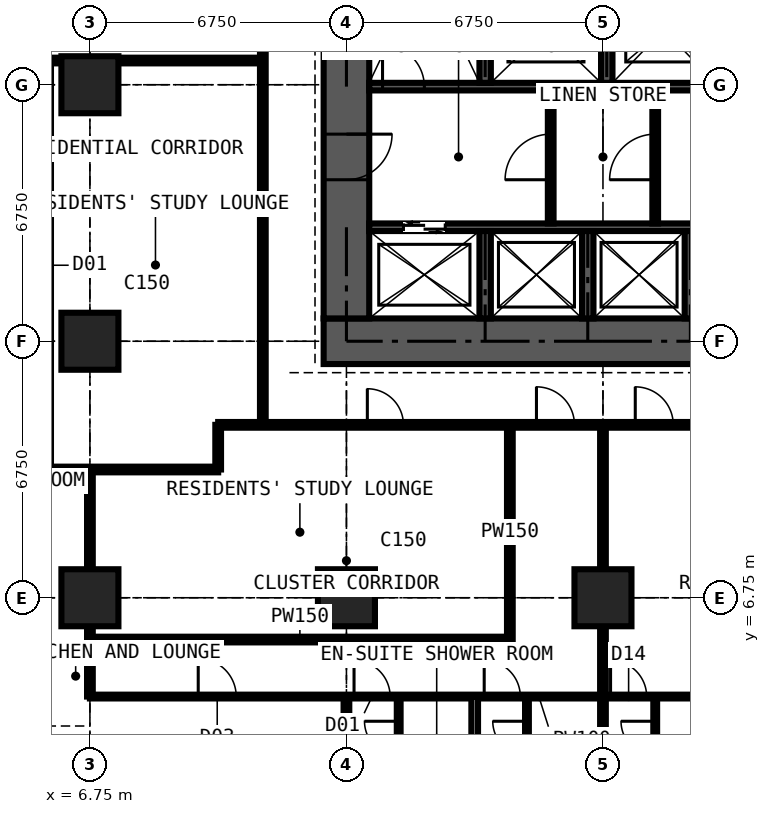
"""IFC4 building model, lengths in metres.
Left out: names, types, materials, properties, quantities, classifications, styles, units other than length and angle.
Written with IfcOpenShell. Run it as: python <this file> out.ifc"""

import sys

from ifc_helpers import new_model, si_unit, direction, frame, frame_2d, origin, origin_2d, place, context, subcontext, project, spatial, rectangle, extrude, element, fill, save


model = new_model("IFC4")
c1 = context("Model", 3, precision=1e-05, world=origin(), true_north=direction((0.0, 1.0)))
c2 = subcontext(c1, "Body", "Model", "MODEL_VIEW")
j1 = project(units=[si_unit("LENGTHUNIT", "METRE"), si_unit("PLANEANGLEUNIT", "RADIAN")], contexts=[c1])
p1 = place(None, origin())
s1 = spatial("IfcSite", under=j1, at=p1, CompositionType="ELEMENT")
p2 = place(p1, origin())
s2 = spatial("IfcBuilding", under=s1, at=p2, CompositionType="ELEMENT")
p3 = place(p2, frame((0.0, 0.0, 123.3)))
s3 = spatial("IfcBuildingStorey", under=s2, at=p3, CompositionType="ELEMENT", Elevation=123.3)
for number, where, z_axis, x_axis in (
    (1, (6.75, 6.75, 0.0), (0.0, 0.0, 1.0), (1.0, 0.0, 0.0)),
    (2, (6.75, 13.5, 0.0), (0.0, 0.0, 1.0), (1.0, 0.0, 0.0)),
    (3, (6.75, 20.25, 0.0), (0.0, 0.0, 1.0), (1.0, 0.0, 0.0)),
    (4, (13.5, 6.75, 0.0), (0.0, 0.0, 1.0), (1.0, 0.0, 0.0)),
    (5, (20.25, 6.75, 0.0), (0.0, 0.0, 1.0), (1.0, 0.0, 0.0)),
):
    element("IfcColumn", number, at=place(p3, frame(where, z_axis=z_axis, x_axis=x_axis)), inside=s3, PredefinedType="COLUMN", context=c2, shape_type="SweptSolid", body=[
        extrude(rectangle(XDim=1.5, YDim=1.5, at=origin_2d()), origin(), (0.0, 0.0, 1.0), 3.6),
    ])
p4 = place(p3, frame((12.9, 13.5, 0.0), z_axis=(0.0, 0.0, 1.0), x_axis=(1.0, 0.0, 0.0)))
e6 = element("IfcWall", 6, at=p4, inside=s3, PredefinedType="SHEAR", context=c2, shape_type="SweptSolid", body=[
    extrude(rectangle(XDim=14.7, YDim=1.2, at=frame_2d((7.35, 0.0))), origin(), (0.0, 0.0, 1.0), 3.6),
])
p5 = place(p3, frame((13.5, 26.4, 0.0), z_axis=(0.0, 0.0, 1.0), x_axis=(0.0, -1.0, 0.0)))
e7 = element("IfcWall", 7, at=p5, inside=s3, PredefinedType="SHEAR", context=c2, shape_type="SweptSolid", body=[
    extrude(rectangle(XDim=12.3, YDim=1.2, at=frame_2d((6.15, 0.0))), origin(), (0.0, 0.0, 1.0), 3.6),
])
p6 = place(p5, frame((7.45, 0.0, 0.0)))
e8 = element("IfcOpeningElement", 8, at=p6, cuts=e7, PredefinedType="OPENING", context=c2, shape_type="SweptSolid", body=[
    extrude(rectangle(XDim=1.2, YDim=2.2, at=frame_2d((0.6, 1.1))), frame((0.0, 0.61, 0.0), z_axis=(0.0, -1.0, 0.0), x_axis=(1.0, 0.0, 0.0)), (0.0, 0.0, 1.0), 1.22),
])
p7 = place(p3, frame((14.1, 16.5, 0.0), z_axis=(0.0, 0.0, 1.0), x_axis=(1.0, 0.0, 0.0)))
e9 = element("IfcWall", 9, at=p7, inside=s3, PredefinedType="SHEAR", context=c2, shape_type="SweptSolid", body=[
    extrude(rectangle(XDim=12.3, YDim=0.2, at=frame_2d((6.15, 0.0))), origin(), (0.0, 0.0, 1.0), 3.6),
])
p8 = place(p7, frame((0.9, 0.0, 0.0)))
e10 = element("IfcOpeningElement", 10, at=p8, cuts=e9, PredefinedType="OPENING", context=c2, shape_type="SweptSolid", body=[
    extrude(rectangle(XDim=1.1, YDim=2.2, at=frame_2d((0.55, 1.1))), frame((0.0, 0.11, 0.0), z_axis=(0.0, -1.0, 0.0), x_axis=(1.0, 0.0, 0.0)), (0.0, 0.0, 1.0), 0.22),
])
p9 = place(p7, frame((9.5, 0.0, 0.0)))
e11 = element("IfcOpeningElement", 11, at=p9, cuts=e9, PredefinedType="OPENING", context=c2, shape_type="SweptSolid", body=[
    extrude(rectangle(XDim=1.1, YDim=2.2, at=frame_2d((0.55, 1.1))), frame((0.0, 0.11, 0.0), z_axis=(0.0, -1.0, 0.0), x_axis=(1.0, 0.0, 0.0)), (0.0, 0.0, 1.0), 0.22),
])
p10 = place(p3, frame((14.1, 20.2, 0.0), z_axis=(0.0, 0.0, 1.0), x_axis=(1.0, 0.0, 0.0)))
e12 = element("IfcWall", 12, at=p10, inside=s3, PredefinedType="SHEAR", context=c2, shape_type="SweptSolid", body=[
    extrude(rectangle(XDim=12.3, YDim=0.2, at=frame_2d((6.15, 0.0))), origin(), (0.0, 0.0, 1.0), 3.6),
])
p11 = place(p10, frame((0.35, 0.0, 0.0)))
e13 = element("IfcOpeningElement", 13, at=p11, cuts=e12, PredefinedType="OPENING", context=c2, shape_type="SweptSolid", body=[
    extrude(rectangle(XDim=1.1, YDim=2.2, at=frame_2d((0.55, 1.1))), frame((0.0, 0.11, 0.0), z_axis=(0.0, -1.0, 0.0), x_axis=(1.0, 0.0, 0.0)), (0.0, 0.0, 1.0), 0.22),
])
p12 = place(p10, frame((9.75, 0.0, 0.0)))
e14 = element("IfcOpeningElement", 14, at=p12, cuts=e12, PredefinedType="OPENING", context=c2, shape_type="SweptSolid", body=[
    extrude(rectangle(XDim=1.1, YDim=2.2, at=frame_2d((0.55, 1.1))), frame((0.0, 0.11, 0.0), z_axis=(0.0, -1.0, 0.0), x_axis=(1.0, 0.0, 0.0)), (0.0, 0.0, 1.0), 0.22),
])
p13 = place(p3, frame((17.15, 20.3, 0.0), z_axis=(0.0, 0.0, 1.0), x_axis=(0.0, 1.0, 0.0)))
e15 = element("IfcWall", 15, at=p13, inside=s3, PredefinedType="SHEAR", context=c2, shape_type="SweptSolid", body=[
    extrude(rectangle(XDim=6.1, YDim=0.3, at=frame_2d((3.05, 0.0))), origin(), (0.0, 0.0, 1.0), 3.6),
])
p14 = place(p3, frame((20.35, 20.3, 0.0), z_axis=(0.0, 0.0, 1.0), x_axis=(0.0, 1.0, 0.0)))
e16 = element("IfcWall", 16, at=p14, inside=s3, PredefinedType="SHEAR", context=c2, shape_type="SweptSolid", body=[
    extrude(rectangle(XDim=2.8, YDim=0.3, at=frame_2d((1.4, 0.0))), origin(), (0.0, 0.0, 1.0), 3.6),
])
for number, where, z_axis, x_axis in (
    (17, (17.15, 14.1, 0.0), (0.0, 0.0, 1.0), (0.0, 1.0, 0.0)),
    (18, (19.85, 14.1, 0.0), (0.0, 0.0, 1.0), (0.0, 1.0, 0.0)),
    (19, (22.55, 14.1, 0.0), (0.0, 0.0, 1.0), (0.0, 1.0, 0.0)),
):
    element("IfcWall", number, at=place(p3, frame(where, z_axis=z_axis, x_axis=x_axis)), inside=s3, PredefinedType="SHEAR", context=c2, shape_type="SweptSolid", body=[
        extrude(rectangle(XDim=2.3, YDim=0.3, at=frame_2d((1.15, 0.0))), origin(), (0.0, 0.0, 1.0), 3.6),
    ])
p15 = place(p3, frame((18.875, 16.6, 0.0), z_axis=(0.0, 0.0, 1.0), x_axis=(0.0, 1.0, 0.0)))
e20 = element("IfcWall", 20, at=p15, inside=s3, PredefinedType="PARTITIONING", context=c2, shape_type="SweptSolid", body=[
    extrude(rectangle(XDim=3.5, YDim=0.15, at=frame_2d((1.75, 0.0))), origin(), (0.0, 0.0, 1.0), 3.375),
])
p16 = place(p15, frame((1.15, 0.0, 0.0)))
e21 = element("IfcOpeningElement", 21, at=p16, cuts=e20, PredefinedType="OPENING", context=c2, shape_type="SweptSolid", body=[
    extrude(rectangle(XDim=1.2, YDim=2.2, at=frame_2d((0.6, 1.1))), frame((0.0, 0.085, 0.0), z_axis=(0.0, -1.0, 0.0), x_axis=(1.0, 0.0, 0.0)), (0.0, 0.0, 1.0), 0.17),
])
p17 = place(p3, frame((21.625, 16.6, 0.0), z_axis=(0.0, 0.0, 1.0), x_axis=(0.0, 1.0, 0.0)))
e22 = element("IfcWall", 22, at=p17, inside=s3, PredefinedType="PARTITIONING", context=c2, shape_type="SweptSolid", body=[
    extrude(rectangle(XDim=3.5, YDim=0.15, at=frame_2d((1.75, 0.0))), origin(), (0.0, 0.0, 1.0), 3.375),
])
p18 = place(p17, frame((1.15, 0.0, 0.0)))
e23 = element("IfcOpeningElement", 23, at=p18, cuts=e22, PredefinedType="OPENING", context=c2, shape_type="SweptSolid", body=[
    extrude(rectangle(XDim=1.2, YDim=2.2, at=frame_2d((0.6, 1.1))), frame((0.0, 0.085, 0.0), z_axis=(0.0, -1.0, 0.0), x_axis=(1.0, 0.0, 0.0)), (0.0, 0.0, 1.0), 0.17),
])
p19 = place(p3, frame((-0.734, 10.125, 0.0), z_axis=(0.0, 0.0, 1.0), x_axis=(1.0, 0.0, 0.0)))
e24 = element("IfcWall", 24, at=p19, inside=s3, PredefinedType="PARTITIONING", context=c2, shape_type="SweptSolid", body=[
    extrude(rectangle(XDim=10.859, YDim=0.15, at=frame_2d((5.429, 0.0))), origin(), (0.0, 0.0, 1.0), 3.375),
])
p20 = place(p3, frame((5.65, 20.887, 0.0), z_axis=(0.0, 0.0, 1.0), x_axis=(1.0, 0.0, 0.0)))
e25 = element("IfcWall", 25, at=p20, inside=s3, PredefinedType="PARTITIONING", context=c2, shape_type="SweptSolid", body=[
    extrude(rectangle(XDim=5.65, YDim=0.15, at=frame_2d((2.825, 0.0))), origin(), (0.0, 0.0, 1.0), 3.375),
])
p21 = place(p3, frame((6.75, 4.15, 0.0), z_axis=(0.0, 0.0, 1.0), x_axis=(0.0, 1.0, 0.0)))
e26 = element("IfcWall", 26, at=p21, inside=s3, PredefinedType="PARTITIONING", context=c2, shape_type="SweptSolid", body=[
    extrude(rectangle(XDim=5.975, YDim=0.15, at=frame_2d((2.988, 0.0))), origin(), (0.0, 0.0, 1.0), 2.877),
])
p22 = place(p3, frame((6.75, 4.15, 0.0), z_axis=(0.0, 0.0, 1.0), x_axis=(1.0, 0.0, 0.0)))
e27 = element("IfcWall", 27, at=p22, inside=s3, PredefinedType="PARTITIONING", context=c2, shape_type="SweptSolid", body=[
    extrude(rectangle(XDim=23.625, YDim=0.1, at=frame_2d((11.812, 0.0))), origin(), (0.0, 0.0, 1.0), 3.375),
])
p23 = place(p22, frame((2.85, 0.0, 0.0)))
e28 = element("IfcOpeningElement", 28, at=p23, cuts=e27, PredefinedType="OPENING", context=c2, shape_type="SweptSolid", body=[
    extrude(rectangle(XDim=1.0, YDim=2.2, at=frame_2d((0.5, 1.1))), frame((0.0, 0.06, 0.0), z_axis=(0.0, -1.0, 0.0), x_axis=(1.0, 0.0, 0.0)), (0.0, 0.0, 1.0), 0.12),
])
p24 = place(p22, frame((6.95, 0.0, 0.0)))
e29 = element("IfcOpeningElement", 29, at=p24, cuts=e27, PredefinedType="OPENING", context=c2, shape_type="SweptSolid", body=[
    extrude(rectangle(XDim=0.95, YDim=2.2, at=frame_2d((0.475, 1.1))), frame((0.0, 0.06, 0.0), z_axis=(0.0, -1.0, 0.0), x_axis=(1.0, 0.0, 0.0)), (0.0, 0.0, 1.0), 0.12),
])
p25 = place(p22, frame((10.375, 0.0, 0.0)))
e30 = element("IfcOpeningElement", 30, at=p25, cuts=e27, PredefinedType="OPENING", context=c2, shape_type="SweptSolid", body=[
    extrude(rectangle(XDim=0.95, YDim=2.2, at=frame_2d((0.475, 1.1))), frame((0.0, 0.06, 0.0), z_axis=(0.0, -1.0, 0.0), x_axis=(1.0, 0.0, 0.0)), (0.0, 0.0, 1.0), 0.12),
])
p26 = place(p22, frame((13.7, 0.0, 0.0)))
e31 = element("IfcOpeningElement", 31, at=p26, cuts=e27, PredefinedType="OPENING", context=c2, shape_type="SweptSolid", body=[
    extrude(rectangle(XDim=0.95, YDim=2.2, at=frame_2d((0.475, 1.1))), frame((0.0, 0.06, 0.0), z_axis=(0.0, -1.0, 0.0), x_axis=(1.0, 0.0, 0.0)), (0.0, 0.0, 1.0), 0.12),
])
p27 = place(p22, frame((17.125, 0.0, 0.0)))
e32 = element("IfcOpeningElement", 32, at=p27, cuts=e27, PredefinedType="OPENING", context=c2, shape_type="SweptSolid", body=[
    extrude(rectangle(XDim=0.95, YDim=2.2, at=frame_2d((0.475, 1.1))), frame((0.0, 0.06, 0.0), z_axis=(0.0, -1.0, 0.0), x_axis=(1.0, 0.0, 0.0)), (0.0, 0.0, 1.0), 0.12),
])
p28 = place(p22, frame((20.5, 0.0, 0.0)))
e33 = element("IfcOpeningElement", 33, at=p28, cuts=e27, PredefinedType="OPENING", context=c2, shape_type="SweptSolid", body=[
    extrude(rectangle(XDim=0.95, YDim=2.2, at=frame_2d((0.475, 1.1))), frame((0.0, 0.06, 0.0), z_axis=(0.0, -1.0, 0.0), x_axis=(1.0, 0.0, 0.0)), (0.0, 0.0, 1.0), 0.12),
])
p29 = place(p3, frame((6.75, 5.65, 0.0), z_axis=(0.0, 0.0, 1.0), x_axis=(1.0, 0.0, 0.0)))
e34 = element("IfcWall", 34, at=p29, inside=s3, PredefinedType="PARTITIONING", context=c2, shape_type="SweptSolid", body=[
    extrude(rectangle(XDim=11.05, YDim=0.15, at=frame_2d((5.525, 0.0))), origin(), (0.0, 0.0, 1.0), 3.375),
])
p30 = place(p3, frame((10.125, 10.125, 0.0), z_axis=(0.0, 0.0, 1.0), x_axis=(0.0, 1.0, 0.0)))
e35 = element("IfcWall", 35, at=p30, inside=s3, PredefinedType="PARTITIONING", context=c2, shape_type="SweptSolid", body=[
    extrude(rectangle(XDim=1.175, YDim=0.15, at=frame_2d((0.587, 0.0))), origin(), (0.0, 0.0, 1.0), 3.375),
])
p31 = place(p3, frame((10.125, 11.3, 0.0), z_axis=(0.0, 0.0, 1.0), x_axis=(1.0, 0.0, 0.0)))
e36 = element("IfcWall", 36, at=p31, inside=s3, PredefinedType="PARTITIONING", context=c2, shape_type="SweptSolid", body=[
    extrude(rectangle(XDim=20.675, YDim=0.15, at=frame_2d((10.337, 0.0))), origin(), (0.0, 0.0, 1.0), 3.375),
])
p32 = place(p31, frame((8.375, 0.0, 0.0)))
e37 = element("IfcOpeningElement", 37, at=p32, cuts=e36, PredefinedType="OPENING", context=c2, shape_type="SweptSolid", body=[
    extrude(rectangle(XDim=1.0, YDim=2.2, at=frame_2d((0.5, 1.1))), frame((0.0, 0.085, 0.0), z_axis=(0.0, -1.0, 0.0), x_axis=(1.0, 0.0, 0.0)), (0.0, 0.0, 1.0), 0.17),
])
p33 = place(p31, frame((10.975, 0.0, 0.0)))
e38 = element("IfcOpeningElement", 38, at=p33, cuts=e36, PredefinedType="OPENING", context=c2, shape_type="SweptSolid", body=[
    extrude(rectangle(XDim=1.0, YDim=2.2, at=frame_2d((0.5, 1.1))), frame((0.0, 0.085, 0.0), z_axis=(0.0, -1.0, 0.0), x_axis=(1.0, 0.0, 0.0)), (0.0, 0.0, 1.0), 0.17),
])
p34 = place(p31, frame((3.925, 0.0, 0.0)))
e39 = element("IfcOpeningElement", 39, at=p34, cuts=e36, PredefinedType="OPENING", context=c2, shape_type="SweptSolid", body=[
    extrude(rectangle(XDim=0.95, YDim=2.2, at=frame_2d((0.475, 1.1))), frame((0.0, 0.085, 0.0), z_axis=(0.0, -1.0, 0.0), x_axis=(1.0, 0.0, 0.0)), (0.0, 0.0, 1.0), 0.17),
])
p35 = place(p3, frame((11.3, 11.3, 0.0), z_axis=(0.0, 0.0, 1.0), x_axis=(0.0, 1.0, 0.0)))
e40 = element("IfcWall", 40, at=p35, inside=s3, PredefinedType="PARTITIONING", context=c2, shape_type="SweptSolid", body=[
    extrude(rectangle(XDim=19.3, YDim=0.15, at=frame_2d((9.65, 0.0))), origin(), (0.0, 0.0, 1.0), 3.375),
])
p36 = place(p35, frame((18.1, 0.0, 0.0)))
e41 = element("IfcOpeningElement", 41, at=p36, cuts=e40, PredefinedType="OPENING", context=c2, shape_type="SweptSolid", body=[
    extrude(rectangle(XDim=1.0, YDim=2.2, at=frame_2d((0.5, 1.1))), frame((0.0, 0.085, 0.0), z_axis=(0.0, -1.0, 0.0), x_axis=(1.0, 0.0, 0.0)), (0.0, 0.0, 1.0), 0.17),
])
p37 = place(p35, frame((10.137, 0.0, 0.0)))
e42 = element("IfcOpeningElement", 42, at=p37, cuts=e40, PredefinedType="OPENING", context=c2, shape_type="SweptSolid", body=[
    extrude(rectangle(XDim=1.0, YDim=2.2, at=frame_2d((0.5, 1.1))), frame((0.0, 0.085, 0.0), z_axis=(0.0, -1.0, 0.0), x_axis=(1.0, 0.0, 0.0)), (0.0, 0.0, 1.0), 0.17),
])
p38 = place(p3, frame((13.5, -0.734, 0.0), z_axis=(0.0, 0.0, 1.0), x_axis=(0.0, 1.0, 0.0)))
e43 = element("IfcWall", 43, at=p38, inside=s3, PredefinedType="PARTITIONING", context=c2, shape_type="SweptSolid", body=[
    extrude(rectangle(XDim=4.884, YDim=0.15, at=frame_2d((2.442, 0.0))), origin(), (0.0, 0.0, 1.0), 2.877),
])
p39 = place(p3, frame((14.875, 1.95, 0.0), z_axis=(0.0, 0.0, 1.0), x_axis=(0.0, 1.0, 0.0)))
e44 = element("IfcWall", 44, at=p39, inside=s3, PredefinedType="PARTITIONING", context=c2, shape_type="SweptSolid", body=[
    extrude(rectangle(XDim=2.2, YDim=0.1, at=frame_2d((1.1, 0.0))), origin(), (0.0, 0.0, 1.0), 3.375),
])
p40 = place(p39, frame((0.65, 0.0, 0.0)))
e45 = element("IfcOpeningElement", 45, at=p40, cuts=e44, PredefinedType="OPENING", context=c2, shape_type="SweptSolid", body=[
    extrude(rectangle(XDim=0.9, YDim=2.2, at=frame_2d((0.45, 1.1))), frame((0.0, 0.06, 0.0), z_axis=(0.0, -1.0, 0.0), x_axis=(1.0, 0.0, 0.0)), (0.0, 0.0, 1.0), 0.12),
])
p41 = place(p3, frame((16.875, -0.734, 0.0), z_axis=(0.0, 0.0, 1.0), x_axis=(0.0, 1.0, 0.0)))
e46 = element("IfcWall", 46, at=p41, inside=s3, PredefinedType="PARTITIONING", context=c2, shape_type="SweptSolid", body=[
    extrude(rectangle(XDim=4.884, YDim=0.175, at=frame_2d((2.442, 0.0))), origin(), (0.0, 0.0, 1.0), 3.375),
])
p42 = place(p3, frame((17.8, 5.65, 0.0), z_axis=(0.0, 0.0, 1.0), x_axis=(0.0, 1.0, 0.0)))
e47 = element("IfcWall", 47, at=p42, inside=s3, PredefinedType="PARTITIONING", context=c2, shape_type="SweptSolid", body=[
    extrude(rectangle(XDim=5.65, YDim=0.15, at=frame_2d((2.825, 0.0))), origin(), (0.0, 0.0, 1.0), 3.375),
])
p43 = place(p3, frame((18.25, 1.95, 0.0), z_axis=(0.0, 0.0, 1.0), x_axis=(0.0, 1.0, 0.0)))
e48 = element("IfcWall", 48, at=p43, inside=s3, PredefinedType="PARTITIONING", context=c2, shape_type="SweptSolid", body=[
    extrude(rectangle(XDim=2.2, YDim=0.1, at=frame_2d((1.1, 0.0))), origin(), (0.0, 0.0, 1.0), 3.375),
])
p44 = place(p43, frame((0.65, 0.0, 0.0)))
e49 = element("IfcOpeningElement", 49, at=p44, cuts=e48, PredefinedType="OPENING", context=c2, shape_type="SweptSolid", body=[
    extrude(rectangle(XDim=0.9, YDim=2.2, at=frame_2d((0.45, 1.1))), frame((0.0, 0.06, 0.0), z_axis=(0.0, -1.0, 0.0), x_axis=(1.0, 0.0, 0.0)), (0.0, 0.0, 1.0), 0.12),
])
p45 = place(p3, frame((20.25, -0.734, 0.0), z_axis=(0.0, 0.0, 1.0), x_axis=(0.0, 1.0, 0.0)))
e50 = element("IfcWall", 50, at=p45, inside=s3, PredefinedType="PARTITIONING", context=c2, shape_type="SweptSolid", body=[
    extrude(rectangle(XDim=12.034, YDim=0.15, at=frame_2d((6.017, 0.0))), origin(), (0.0, 0.0, 1.0), 2.61),
])
p46 = place(p3, frame((21.625, 1.95, 0.0), z_axis=(0.0, 0.0, 1.0), x_axis=(0.0, 1.0, 0.0)))
e51 = element("IfcWall", 51, at=p46, inside=s3, PredefinedType="PARTITIONING", context=c2, shape_type="SweptSolid", body=[
    extrude(rectangle(XDim=2.2, YDim=0.1, at=frame_2d((1.1, 0.0))), origin(), (0.0, 0.0, 1.0), 3.375),
])
p47 = place(p46, frame((0.65, 0.0, 0.0)))
e52 = element("IfcOpeningElement", 52, at=p47, cuts=e51, PredefinedType="OPENING", context=c2, shape_type="SweptSolid", body=[
    extrude(rectangle(XDim=0.9, YDim=2.2, at=frame_2d((0.45, 1.1))), frame((0.0, 0.06, 0.0), z_axis=(0.0, -1.0, 0.0), x_axis=(1.0, 0.0, 0.0)), (0.0, 0.0, 1.0), 0.12),
])
p48 = place(p8, origin())
e53 = element("IfcDoor", 53, at=p48, inside=s3, OperationType="DOUBLE_DOOR_SLIDING", PredefinedType="DOOR", context=c2, shape_type="SweptSolid", body=[
    extrude(rectangle(XDim=1.1, YDim=2.2, at=frame_2d((0.55, 1.1))), frame((0.0, 0.025, 0.0), z_axis=(0.0, -1.0, 0.0), x_axis=(1.0, 0.0, 0.0)), (0.0, 0.0, 1.0), 0.05),
])
fill(e10, e53)
p49 = place(p6, origin())
e54 = element("IfcDoor", 54, at=p49, inside=s3, OperationType="DOUBLE_DOOR_SINGLE_SWING", PredefinedType="DOOR", context=c2, shape_type="SweptSolid", body=[
    extrude(rectangle(XDim=1.2, YDim=2.2, at=frame_2d((0.6, 1.1))), frame((0.0, 0.025, 0.0), z_axis=(0.0, -1.0, 0.0), x_axis=(1.0, 0.0, 0.0)), (0.0, 0.0, 1.0), 0.05),
])
fill(e8, e54)
p50 = place(p16, origin())
e55 = element("IfcDoor", 55, at=p50, inside=s3, OperationType="DOUBLE_DOOR_SINGLE_SWING", PredefinedType="DOOR", context=c2, shape_type="SweptSolid", body=[
    extrude(rectangle(XDim=1.2, YDim=2.2, at=frame_2d((0.6, 1.1))), frame((0.0, 0.025, 0.0), z_axis=(0.0, -1.0, 0.0), x_axis=(1.0, 0.0, 0.0)), (0.0, 0.0, 1.0), 0.05),
])
fill(e21, e55)
p51 = place(p18, origin())
e56 = element("IfcDoor", 56, at=p51, inside=s3, OperationType="DOUBLE_DOOR_SINGLE_SWING", PredefinedType="DOOR", context=c2, shape_type="SweptSolid", body=[
    extrude(rectangle(XDim=1.2, YDim=2.2, at=frame_2d((0.6, 1.1))), frame((0.0, 0.025, 0.0), z_axis=(0.0, -1.0, 0.0), x_axis=(1.0, 0.0, 0.0)), (0.0, 0.0, 1.0), 0.05),
])
fill(e23, e56)
p52 = place(p11, origin())
e57 = element("IfcDoor", 57, at=p52, inside=s3, OperationType="SINGLE_SWING_LEFT", PredefinedType="DOOR", context=c2, shape_type="SweptSolid", body=[
    extrude(rectangle(XDim=1.1, YDim=2.2, at=frame_2d((0.55, 1.1))), frame((0.0, 0.025, 0.0), z_axis=(0.0, -1.0, 0.0), x_axis=(1.0, 0.0, 0.0)), (0.0, 0.0, 1.0), 0.05),
])
fill(e13, e57)
p53 = place(p23, origin())
e58 = element("IfcDoor", 58, at=p53, inside=s3, OperationType="SINGLE_SWING_LEFT", PredefinedType="DOOR", context=c2, shape_type="SweptSolid", body=[
    extrude(rectangle(XDim=1.0, YDim=2.2, at=frame_2d((0.5, 1.1))), frame((0.0, 0.025, 0.0), z_axis=(0.0, -1.0, 0.0), x_axis=(1.0, 0.0, 0.0)), (0.0, 0.0, 1.0), 0.05),
])
fill(e28, e58)
p54 = place(p24, origin())
e59 = element("IfcDoor", 59, at=p54, inside=s3, OperationType="SINGLE_SWING_LEFT", PredefinedType="DOOR", context=c2, shape_type="SweptSolid", body=[
    extrude(rectangle(XDim=0.95, YDim=2.2, at=frame_2d((0.475, 1.1))), frame((0.0, 0.025, 0.0), z_axis=(0.0, -1.0, 0.0), x_axis=(1.0, 0.0, 0.0)), (0.0, 0.0, 1.0), 0.05),
])
fill(e29, e59)
p55 = place(p40, origin())
e60 = element("IfcDoor", 60, at=p55, inside=s3, OperationType="SINGLE_SWING_RIGHT", PredefinedType="DOOR", context=c2, shape_type="SweptSolid", body=[
    extrude(rectangle(XDim=0.9, YDim=2.2, at=frame_2d((0.45, 1.1))), frame((0.0, 0.025, 0.0), z_axis=(0.0, -1.0, 0.0), x_axis=(1.0, 0.0, 0.0)), (0.0, 0.0, 1.0), 0.05),
])
fill(e45, e60)
p56 = place(p25, origin())
e61 = element("IfcDoor", 61, at=p56, inside=s3, OperationType="SINGLE_SWING_LEFT", PredefinedType="DOOR", context=c2, shape_type="SweptSolid", body=[
    extrude(rectangle(XDim=0.95, YDim=2.2, at=frame_2d((0.475, 1.1))), frame((0.0, 0.025, 0.0), z_axis=(0.0, -1.0, 0.0), x_axis=(1.0, 0.0, 0.0)), (0.0, 0.0, 1.0), 0.05),
])
fill(e30, e61)
p57 = place(p44, origin())
e62 = element("IfcDoor", 62, at=p57, inside=s3, OperationType="SINGLE_SWING_RIGHT", PredefinedType="DOOR", context=c2, shape_type="SweptSolid", body=[
    extrude(rectangle(XDim=0.9, YDim=2.2, at=frame_2d((0.45, 1.1))), frame((0.0, 0.025, 0.0), z_axis=(0.0, -1.0, 0.0), x_axis=(1.0, 0.0, 0.0)), (0.0, 0.0, 1.0), 0.05),
])
fill(e49, e62)
p58 = place(p32, origin())
e63 = element("IfcDoor", 63, at=p58, inside=s3, OperationType="SINGLE_SWING_LEFT", PredefinedType="DOOR", context=c2, shape_type="SweptSolid", body=[
    extrude(rectangle(XDim=1.0, YDim=2.2, at=frame_2d((0.5, 1.1))), frame((0.0, 0.025, 0.0), z_axis=(0.0, -1.0, 0.0), x_axis=(1.0, 0.0, 0.0)), (0.0, 0.0, 1.0), 0.05),
])
fill(e37, e63)
p59 = place(p26, origin())
e64 = element("IfcDoor", 64, at=p59, inside=s3, OperationType="SINGLE_SWING_LEFT", PredefinedType="DOOR", context=c2, shape_type="SweptSolid", body=[
    extrude(rectangle(XDim=0.95, YDim=2.2, at=frame_2d((0.475, 1.1))), frame((0.0, 0.025, 0.0), z_axis=(0.0, -1.0, 0.0), x_axis=(1.0, 0.0, 0.0)), (0.0, 0.0, 1.0), 0.05),
])
fill(e31, e64)
p60 = place(p47, origin())
e65 = element("IfcDoor", 65, at=p60, inside=s3, OperationType="SINGLE_SWING_RIGHT", PredefinedType="DOOR", context=c2, shape_type="SweptSolid", body=[
    extrude(rectangle(XDim=0.9, YDim=2.2, at=frame_2d((0.45, 1.1))), frame((0.0, 0.025, 0.0), z_axis=(0.0, -1.0, 0.0), x_axis=(1.0, 0.0, 0.0)), (0.0, 0.0, 1.0), 0.05),
])
fill(e52, e65)
p61 = place(p33, origin())
e66 = element("IfcDoor", 66, at=p61, inside=s3, OperationType="SINGLE_SWING_LEFT", PredefinedType="DOOR", context=c2, shape_type="SweptSolid", body=[
    extrude(rectangle(XDim=1.0, YDim=2.2, at=frame_2d((0.5, 1.1))), frame((0.0, 0.025, 0.0), z_axis=(0.0, -1.0, 0.0), x_axis=(1.0, 0.0, 0.0)), (0.0, 0.0, 1.0), 0.05),
])
fill(e38, e66)
p62 = place(p34, origin())
e67 = element("IfcDoor", 67, at=p62, inside=s3, OperationType="SINGLE_SWING_LEFT", PredefinedType="DOOR", context=c2, shape_type="SweptSolid", body=[
    extrude(rectangle(XDim=0.95, YDim=2.2, at=frame_2d((0.475, 1.1))), frame((0.0, 0.025, 0.0), z_axis=(0.0, -1.0, 0.0), x_axis=(1.0, 0.0, 0.0)), (0.0, 0.0, 1.0), 0.05),
])
fill(e39, e67)
save(model, sys.argv[1])
